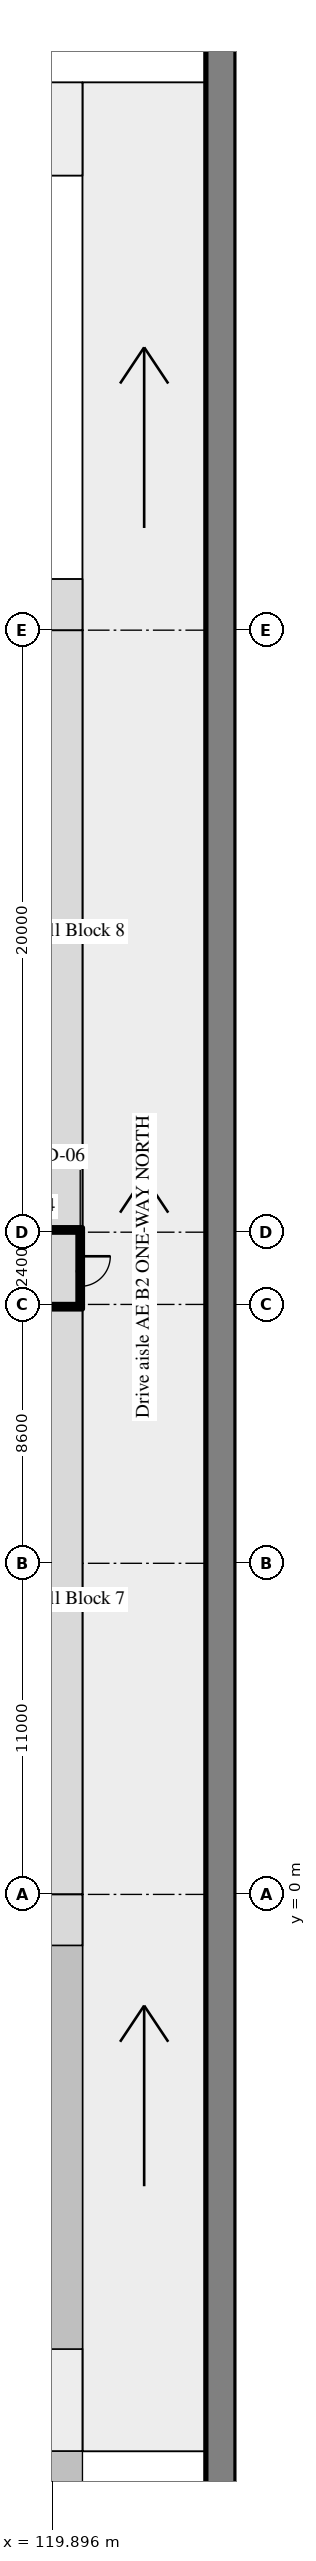
"""IFC4 building model, lengths in metres.
Left out: names, types, materials, properties, quantities, classifications, styles, units other than length and angle.
Written with IfcOpenShell. Run it as: python <this file> out.ifc"""

import sys

from ifc_helpers import new_model, si_unit, direction, frame, frame_2d, origin, place, context, subcontext, project, spatial, rectangle, extrude, source, transform, mapped, element, fill, save


model = new_model("IFC4")
c1 = context("Model", 3, precision=1e-05, world=origin(), true_north=direction((0.0, 1.0)))
c2 = subcontext(c1, "Body", "Model", "MODEL_VIEW")
j1 = project(units=[si_unit("LENGTHUNIT", "METRE"), si_unit("PLANEANGLEUNIT", "RADIAN")], contexts=[c1])
p1 = place(None, origin())
s1 = spatial("IfcSite", under=j1, at=p1, CompositionType="ELEMENT")
p2 = place(p1, origin())
s2 = spatial("IfcBuilding", under=s1, at=p2, CompositionType="ELEMENT")
p3 = place(p2, frame((0.0, 0.0, -9.0)))
s3 = spatial("IfcBuildingStorey", under=s2, at=p3, CompositionType="ELEMENT", Elevation=-9.0)
m1 = source(origin(), c2, "Body", "SweptSolid", [
    extrude(rectangle(XDim=98.8, YDim=1.0, at=frame_2d((49.4, 0.0))), origin(), (0.0, 0.0, 1.0), 4.22),
])
p4 = place(p3, frame((125.5, -32.6, 0.0), z_axis=(0.0, 0.0, 1.0), x_axis=(0.0, 1.0, 0.0)))
e1 = element("IfcWall", 1, at=p4, inside=s3, PredefinedType="SHEAR", context=c2, shape_type="MappedRepresentation", body=[
    mapped(m1, transform((0.0, 0.0, 0.0), scale=1.0)),
])
m2 = source(origin(), c2, "Body", "SweptSolid", [
    extrude(rectangle(XDim=20.1, YDim=0.15, at=frame_2d((10.05, 0.0))), origin(), (0.0, 0.0, 1.0), 4.22),
])
p5 = place(p3, frame((100.8, 19.525, 0.0), z_axis=(0.0, 0.0, 1.0), x_axis=(1.0, 0.0, 0.0)))
e2 = element("IfcWall", 2, at=p5, inside=s3, PredefinedType="PARTITIONING", context=c2, shape_type="MappedRepresentation", body=[
    mapped(m2, transform((0.0, 0.0, 0.0), scale=1.0)),
])
m3 = source(origin(), c2, "Body", "SweptSolid", [
    extrude(rectangle(XDim=1.0, YDim=2.1, at=frame_2d((0.5, 1.05))), frame((0.0, 0.085, 0.0), z_axis=(0.0, -1.0, 0.0), x_axis=(1.0, 0.0, 0.0)), (0.0, 0.0, 1.0), 0.17),
])
p6 = place(p5, frame((17.4, 0.0, 0.0)))
e3 = element("IfcOpeningElement", 3, at=p6, cuts=e2, PredefinedType="OPENING", context=c2, shape_type="MappedRepresentation", body=[
    mapped(m3, transform((0.0, 0.0, 0.0), scale=1.0)),
])
p7 = place(p3, frame((100.8, 22.075, 0.0), z_axis=(0.0, 0.0, 1.0), x_axis=(1.0, 0.0, 0.0)))
e4 = element("IfcWall", 4, at=p7, inside=s3, PredefinedType="PARTITIONING", context=c2, shape_type="MappedRepresentation", body=[
    mapped(m2, transform((0.0, 0.0, 0.0), scale=1.0)),
])
p8 = place(p7, frame((17.4, 0.0, 0.0)))
e5 = element("IfcOpeningElement", 5, at=p8, cuts=e4, PredefinedType="OPENING", context=c2, shape_type="MappedRepresentation", body=[
    mapped(m3, transform((0.0, 0.0, 0.0), scale=1.0)),
])
m4 = source(origin(), c2, "Body", "SweptSolid", [
    extrude(rectangle(XDim=2.4, YDim=0.15, at=frame_2d((1.2, 0.0))), origin(), (0.0, 0.0, 1.0), 4.22),
])
p9 = place(p3, frame((120.825, 19.6, 0.0), z_axis=(0.0, 0.0, 1.0), x_axis=(0.0, 1.0, 0.0)))
e6 = element("IfcWall", 6, at=p9, inside=s3, PredefinedType="PARTITIONING", context=c2, shape_type="MappedRepresentation", body=[
    mapped(m4, transform((0.0, 0.0, 0.0), scale=1.0)),
])
p10 = place(p9, frame((0.6, 0.0, 0.0)))
e7 = element("IfcOpeningElement", 7, at=p10, cuts=e6, PredefinedType="OPENING", context=c2, shape_type="MappedRepresentation", body=[
    mapped(m3, transform((0.0, 0.0, 0.0), scale=1.0)),
])
m5 = source(origin(), c2, "Body", "SweptSolid", [
    extrude(rectangle(XDim=1.0, YDim=2.1, at=frame_2d((0.5, 1.05))), frame((0.0, 0.025, 0.0), z_axis=(0.0, -1.0, 0.0), x_axis=(1.0, 0.0, 0.0)), (0.0, 0.0, 1.0), 0.05),
])
p11 = place(p10, origin())
e8 = element("IfcDoor", 8, at=p11, inside=s3, OperationType="SINGLE_SWING_RIGHT", PredefinedType="DOOR", context=c2, shape_type="MappedRepresentation", body=[
    mapped(m5, transform((0.0, 0.0, 0.0), scale=1.0)),
])
fill(e7, e8)
save(model, sys.argv[1])
